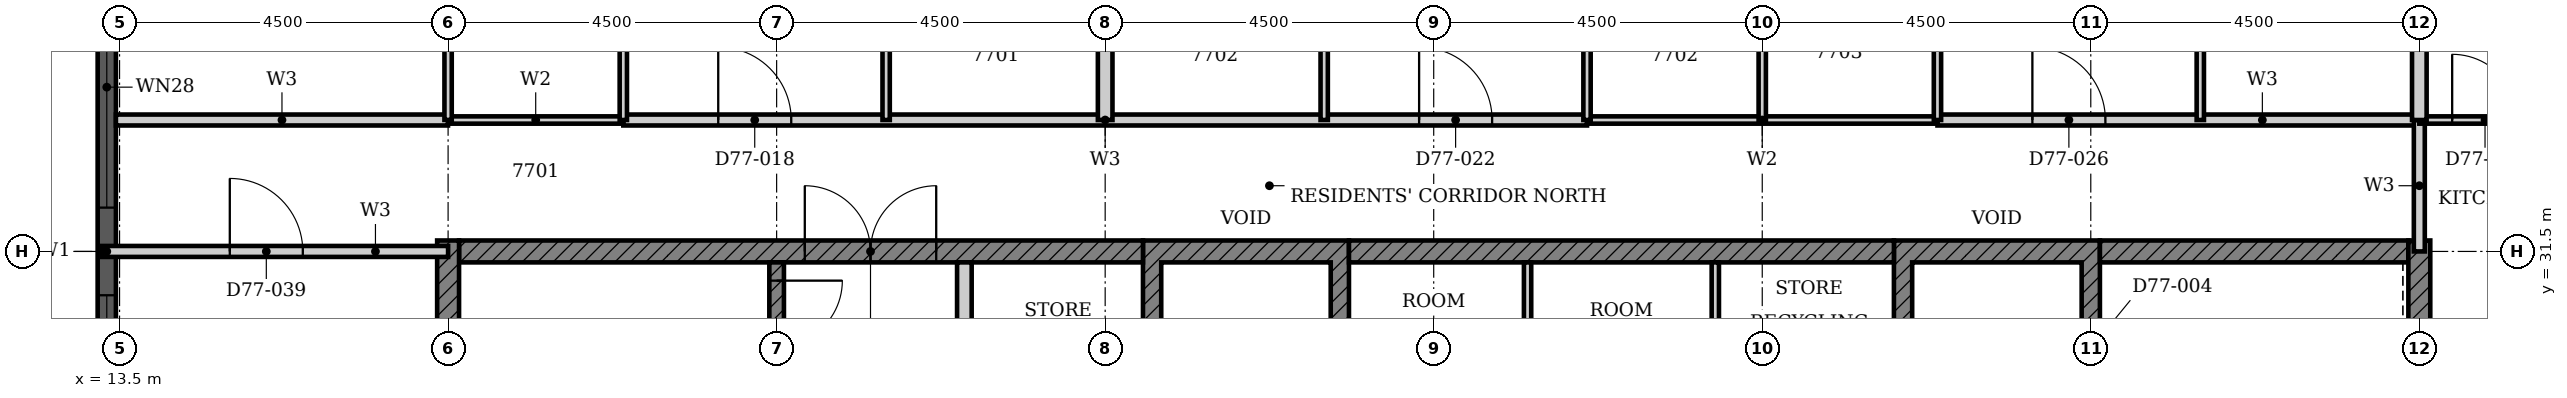
"""IFC4 building model, lengths in metres.
Left out: names, types, materials, properties, quantities, classifications, styles, units other than length and angle.
Written with IfcOpenShell. Run it as: python <this file> out.ifc"""

import sys

from ifc_helpers import new_model, si_unit, direction, frame, frame_2d, origin, place, context, subcontext, project, spatial, polyline, rectangle, outline, extrude, element, fill, save


model = new_model("IFC4")
c1 = context("Model", 3, precision=1e-05, world=origin(), true_north=direction((0.0, 1.0)))
c2 = subcontext(c1, "Body", "Model", "MODEL_VIEW")
j1 = project(units=[si_unit("LENGTHUNIT", "METRE"), si_unit("PLANEANGLEUNIT", "RADIAN")], contexts=[c1])
p1 = place(None, origin())
s1 = spatial("IfcSite", under=j1, at=p1, CompositionType="ELEMENT")
p2 = place(p1, origin())
s2 = spatial("IfcBuilding", under=s1, at=p2, CompositionType="ELEMENT")
p3 = place(p2, frame((0.0, 0.0, 301.9)))
s3 = spatial("IfcBuildingStorey", under=s2, at=p3, CompositionType="ELEMENT", Elevation=301.9)
p4 = place(p3, frame((13.325, 35.7, 0.0), z_axis=(0.0, 0.0, 1.0), x_axis=(0.0, -1.0, 0.0)))
e1 = element("IfcWall", 1, at=p4, inside=s3, PredefinedType="SOLIDWALL", context=c2, shape_type="SweptSolid", body=[
    extrude(rectangle(XDim=8.4, YDim=0.25, at=frame_2d((4.2, 0.0))), origin(), (0.0, 0.0, 1.0), 3.7),
])
p5 = place(p4, frame((0.3, 0.0, 0.45)))
e2 = element("IfcOpeningElement", 2, at=p5, cuts=e1, PredefinedType="OPENING", context=c2, shape_type="SweptSolid", body=[
    extrude(rectangle(XDim=3.3, YDim=1.8, at=frame_2d((1.65, 0.9))), frame((0.0, 0.135, 0.0), z_axis=(0.0, -1.0, 0.0), x_axis=(1.0, 0.0, 0.0)), (0.0, 0.0, 1.0), 0.27),
])
p6 = place(p4, frame((4.8, 0.0, 0.45)))
e3 = element("IfcOpeningElement", 3, at=p6, cuts=e1, PredefinedType="OPENING", context=c2, shape_type="SweptSolid", body=[
    extrude(rectangle(XDim=3.3, YDim=1.8, at=frame_2d((1.65, 0.9))), frame((0.0, 0.135, 0.0), z_axis=(0.0, -1.0, 0.0), x_axis=(1.0, 0.0, 0.0)), (0.0, 0.0, 1.0), 0.27),
])
p7 = place(p3, origin())
e4 = element("IfcWall", 4, at=p7, inside=s3, PredefinedType="SHEAR", context=c2, shape_type="SweptSolid", body=[
    extrude(outline(polyline([(27.518, 28.725), (27.768, 28.725), (27.768, 31.35), (30.089, 31.35), (30.089, 28.725), (30.339, 28.725), (30.339, 31.65), (27.518, 31.65), (27.518, 28.725)])), origin(), (0.0, 0.0, 1.0), 3.2),
])
p8 = place(p3, origin())
e5 = element("IfcWall", 5, at=p8, inside=s3, PredefinedType="SHEAR", context=c2, shape_type="SweptSolid", body=[
    extrude(outline(polyline([(37.803, 28.725), (38.053, 28.725), (38.053, 31.35), (40.375, 31.35), (40.375, 28.725), (40.625, 28.725), (40.625, 31.65), (37.803, 31.65), (37.803, 28.725)])), origin(), (0.0, 0.0, 1.0), 3.2),
])
p9 = place(p3, frame((18.15, 31.5, 0.0), z_axis=(0.0, 0.0, 1.0), x_axis=(1.0, 0.0, 0.0)))
e6 = element("IfcWall", 6, at=p9, inside=s3, PredefinedType="SHEAR", context=c2, shape_type="SweptSolid", body=[
    extrude(rectangle(XDim=9.368, YDim=0.3, at=frame_2d((4.684, 0.0))), origin(), (0.0, 0.0, 1.0), 3.2),
])
p10 = place(p9, frame((4.736, 0.0, 0.0)))
e7 = element("IfcOpeningElement", 7, at=p10, cuts=e6, PredefinedType="OPENING", context=c2, shape_type="SweptSolid", body=[
    extrude(rectangle(XDim=1.8, YDim=2.1, at=frame_2d((0.9, 1.05))), frame((0.0, 0.16, 0.0), z_axis=(0.0, -1.0, 0.0), x_axis=(1.0, 0.0, 0.0)), (0.0, 0.0, 1.0), 0.32),
])
p11 = place(p3, frame((30.339, 31.5, 0.0), z_axis=(0.0, 0.0, 1.0), x_axis=(1.0, 0.0, 0.0)))
e8 = element("IfcWall", 8, at=p11, inside=s3, PredefinedType="SHEAR", context=c2, shape_type="SweptSolid", body=[
    extrude(rectangle(XDim=7.464, YDim=0.3, at=frame_2d((3.732, 0.0))), origin(), (0.0, 0.0, 1.0), 3.2),
])
p12 = place(p3, frame((40.625, 31.5, 0.0), z_axis=(0.0, 0.0, 1.0), x_axis=(1.0, 0.0, 0.0)))
e9 = element("IfcWall", 9, at=p12, inside=s3, PredefinedType="SHEAR", context=c2, shape_type="SweptSolid", body=[
    extrude(rectangle(XDim=4.225, YDim=0.3, at=frame_2d((2.113, 0.0))), origin(), (0.0, 0.0, 1.0), 3.2),
])
for number, where, z_axis, x_axis in (
    (10, (18.0, 22.35, 0.0), (0.0, 0.0, 1.0), (0.0, 1.0, 0.0)),
    (11, (45.0, 22.35, 0.0), (0.0, 0.0, 1.0), (0.0, 1.0, 0.0)),
):
    element("IfcWall", number, at=place(p3, frame(where, z_axis=z_axis, x_axis=x_axis)), inside=s3, PredefinedType="SHEAR", context=c2, shape_type="SweptSolid", body=[
        extrude(rectangle(XDim=9.3, YDim=0.3, at=frame_2d((4.65, 0.0))), origin(), (0.0, 0.0, 1.0), 3.2),
    ])
p13 = place(p3, frame((25.072, 28.725, 0.0), z_axis=(0.0, 0.0, 1.0), x_axis=(0.0, 1.0, 0.0)))
e12 = element("IfcWall", 12, at=p13, inside=s3, PredefinedType="PARTITIONING", context=c2, shape_type="SweptSolid", body=[
    extrude(rectangle(XDim=2.625, YDim=0.2, at=frame_2d((1.312, 0.0))), origin(), (0.0, 0.0, 1.0), 3.2),
])
for number, where, z_axis, x_axis in (
    (13, (32.786, 28.725, 0.0), (0.0, 0.0, 1.0), (0.0, 1.0, 0.0)),
    (14, (35.357, 28.725, 0.0), (0.0, 0.0, 1.0), (0.0, 1.0, 0.0)),
):
    element("IfcWall", number, at=place(p3, frame(where, z_axis=z_axis, x_axis=x_axis)), inside=s3, PredefinedType="PARTITIONING", context=c2, shape_type="SweptSolid", body=[
        extrude(rectangle(XDim=2.625, YDim=0.1, at=frame_2d((1.312, 0.0))), origin(), (0.0, 0.0, 1.0), 3.2),
    ])
p14 = place(p3, frame((22.5, 31.35, 0.0), z_axis=(0.0, 0.0, 1.0), x_axis=(0.0, -1.0, 0.0)))
e15 = element("IfcWall", 15, at=p14, inside=s3, PredefinedType="SHEAR", context=c2, shape_type="SweptSolid", body=[
    extrude(rectangle(XDim=5.825, YDim=0.2, at=frame_2d((2.913, 0.0))), origin(), (0.0, 0.0, 1.0), 3.2),
])
p15 = place(p14, frame((0.25, 0.0, 0.0)))
e16 = element("IfcOpeningElement", 16, at=p15, cuts=e15, PredefinedType="OPENING", context=c2, shape_type="SweptSolid", body=[
    extrude(rectangle(XDim=1.8, YDim=2.1, at=frame_2d((0.9, 1.05))), frame((0.0, 0.11, 0.0), z_axis=(0.0, -1.0, 0.0), x_axis=(1.0, 0.0, 0.0)), (0.0, 0.0, 1.0), 0.22),
])
p16 = place(p3, frame((13.26, 31.5, 0.0), z_axis=(0.0, 0.0, 1.0), x_axis=(1.0, 0.0, 0.0)))
e17 = element("IfcWall", 17, at=p16, inside=s3, PredefinedType="PARTITIONING", context=c2, shape_type="SweptSolid", body=[
    extrude(rectangle(XDim=4.74, YDim=0.15, at=frame_2d((2.37, 0.0))), origin(), (0.0, 0.0, 1.0), 3.2),
])
p17 = place(p16, frame((1.75, 0.0, 0.0)))
e18 = element("IfcOpeningElement", 18, at=p17, cuts=e17, PredefinedType="OPENING", context=c2, shape_type="SweptSolid", body=[
    extrude(rectangle(XDim=1.0, YDim=2.2, at=frame_2d((0.5, 1.1))), frame((0.0, 0.085, 0.0), z_axis=(0.0, -1.0, 0.0), x_axis=(1.0, 0.0, 0.0)), (0.0, 0.0, 1.0), 0.17),
])
p18 = place(p3, frame((13.45, 33.3, 0.0), z_axis=(0.0, 0.0, 1.0), x_axis=(1.0, 0.0, 0.0)))
e19 = element("IfcWall", 19, at=p18, inside=s3, PredefinedType="PARTITIONING", context=c2, shape_type="SweptSolid", body=[
    extrude(rectangle(XDim=4.549, YDim=0.15, at=frame_2d((2.274, 0.0))), origin(), (0.0, 0.0, 1.0), 3.2),
])
p19 = place(p3, frame((20.4, 33.3, 0.0), z_axis=(0.0, 0.0, 1.0), x_axis=(1.0, 0.0, 0.0)))
e20 = element("IfcWall", 20, at=p19, inside=s3, PredefinedType="PARTITIONING", context=c2, shape_type="SweptSolid", body=[
    extrude(rectangle(XDim=13.2, YDim=0.15, at=frame_2d((6.6, 0.0))), origin(), (0.0, 0.0, 1.0), 3.2),
])
p20 = place(p19, frame((1.3, 0.0, 0.0)))
e21 = element("IfcOpeningElement", 21, at=p20, cuts=e20, PredefinedType="OPENING", context=c2, shape_type="SweptSolid", body=[
    extrude(rectangle(XDim=1.0, YDim=2.2, at=frame_2d((0.5, 1.1))), frame((0.0, 0.085, 0.0), z_axis=(0.0, -1.0, 0.0), x_axis=(1.0, 0.0, 0.0)), (0.0, 0.0, 1.0), 0.17),
])
p21 = place(p19, frame((10.9, 0.0, 0.0)))
e22 = element("IfcOpeningElement", 22, at=p21, cuts=e20, PredefinedType="OPENING", context=c2, shape_type="SweptSolid", body=[
    extrude(rectangle(XDim=1.0, YDim=2.2, at=frame_2d((0.5, 1.1))), frame((0.0, 0.085, 0.0), z_axis=(0.0, -1.0, 0.0), x_axis=(1.0, 0.0, 0.0)), (0.0, 0.0, 1.0), 0.17),
])
p22 = place(p3, frame((38.4, 33.3, 0.0), z_axis=(0.0, 0.0, 1.0), x_axis=(1.0, 0.0, 0.0)))
e23 = element("IfcWall", 23, at=p22, inside=s3, PredefinedType="PARTITIONING", context=c2, shape_type="SweptSolid", body=[
    extrude(rectangle(XDim=6.6, YDim=0.15, at=frame_2d((3.3, 0.0))), origin(), (0.0, 0.0, 1.0), 3.2),
])
p23 = place(p22, frame((1.3, 0.0, 0.0)))
e24 = element("IfcOpeningElement", 24, at=p23, cuts=e23, PredefinedType="OPENING", context=c2, shape_type="SweptSolid", body=[
    extrude(rectangle(XDim=1.0, YDim=2.2, at=frame_2d((0.5, 1.1))), frame((0.0, 0.085, 0.0), z_axis=(0.0, -1.0, 0.0), x_axis=(1.0, 0.0, 0.0)), (0.0, 0.0, 1.0), 0.17),
])
p24 = place(p3, frame((45.0, 31.5, 0.0), z_axis=(0.0, 0.0, 1.0), x_axis=(0.0, 1.0, 0.0)))
e25 = element("IfcWall", 25, at=p24, inside=s3, PredefinedType="PARTITIONING", context=c2, shape_type="SweptSolid", body=[
    extrude(rectangle(XDim=1.8, YDim=0.15, at=frame_2d((0.9, 0.0))), origin(), (0.0, 0.0, 1.0), 3.2),
])
p25 = place(p3, frame((45.0, 33.3, 0.0), z_axis=(0.0, 0.0, 1.0), x_axis=(1.0, 0.0, 0.0)))
e26 = element("IfcWall", 26, at=p25, inside=s3, PredefinedType="PARTITIONING", context=c2, shape_type="SweptSolid", body=[
    extrude(rectangle(XDim=1.8, YDim=0.1, at=frame_2d((0.9, 0.0))), origin(), (0.0, 0.0, 1.0), 3.2),
])
p26 = place(p25, frame((0.45, 0.0, 0.0)))
e27 = element("IfcOpeningElement", 27, at=p26, cuts=e26, PredefinedType="OPENING", context=c2, shape_type="SweptSolid", body=[
    extrude(rectangle(XDim=0.9, YDim=2.1, at=frame_2d((0.45, 1.05))), frame((0.0, 0.06, 0.0), z_axis=(0.0, -1.0, 0.0), x_axis=(1.0, 0.0, 0.0)), (0.0, 0.0, 1.0), 0.12),
])
for number, where, z_axis, x_axis in (
    (28, (24.0, 33.3, 0.0), (0.0, 0.0, 1.0), (0.0, 1.0, 0.0)),
    (29, (30.0, 33.3, 0.0), (0.0, 0.0, 1.0), (0.0, 1.0, 0.0)),
    (30, (42.0, 33.3, 0.0), (0.0, 0.0, 1.0), (0.0, 1.0, 0.0)),
):
    element("IfcWall", number, at=place(p3, frame(where, z_axis=z_axis, x_axis=x_axis)), inside=s3, PredefinedType="PARTITIONING", context=c2, shape_type="SweptSolid", body=[
        extrude(rectangle(XDim=2.7, YDim=0.1, at=frame_2d((1.35, 0.0))), origin(), (0.0, 0.0, 1.0), 3.2),
    ])
p27 = place(p3, frame((27.0, 33.3, 0.0), z_axis=(0.0, 0.0, 1.0), x_axis=(0.0, 1.0, 0.0)))
e31 = element("IfcWall", 31, at=p27, inside=s3, PredefinedType="PARTITIONING", context=c2, shape_type="SweptSolid", body=[
    extrude(rectangle(XDim=7.39, YDim=0.2, at=frame_2d((3.695, 0.0))), origin(), (0.0, 0.0, 1.0), 3.2),
])
p28 = place(p3, frame((45.0, 33.3, 0.0), z_axis=(0.0, 0.0, 1.0), x_axis=(0.0, 1.0, 0.0)))
e32 = element("IfcWall", 32, at=p28, inside=s3, PredefinedType="PARTITIONING", context=c2, shape_type="SweptSolid", body=[
    extrude(rectangle(XDim=4.9, YDim=0.2, at=frame_2d((2.45, 0.0))), origin(), (0.0, 0.0, 1.0), 3.2),
])
p29 = place(p3, frame((18.0, 33.3, 0.0), z_axis=(0.0, 0.0, 1.0), x_axis=(1.0, 0.0, 0.0)))
e33 = element("IfcWall", 33, at=p29, inside=s3, PredefinedType="PARTITIONING", context=c2, shape_type="SweptSolid", body=[
    extrude(rectangle(XDim=2.4, YDim=0.1, at=frame_2d((1.2, 0.0))), origin(), (0.0, 0.0, 1.0), 3.2),
])
p30 = place(p3, frame((33.6, 33.3, 0.0), z_axis=(0.0, 0.0, 1.0), x_axis=(1.0, 0.0, 0.0)))
e34 = element("IfcWall", 34, at=p30, inside=s3, PredefinedType="PARTITIONING", context=c2, shape_type="SweptSolid", body=[
    extrude(rectangle(XDim=4.8, YDim=0.1, at=frame_2d((2.4, 0.0))), origin(), (0.0, 0.0, 1.0), 3.2),
])
p31 = place(p3, frame((18.0, 33.301, 0.0), z_axis=(0.0, 0.0, 1.0), x_axis=(0.0, 1.0, 0.0)))
e35 = element("IfcWall", 35, at=p31, inside=s3, PredefinedType="PARTITIONING", context=c2, shape_type="SweptSolid", body=[
    extrude(rectangle(XDim=2.699, YDim=0.1, at=frame_2d((1.35, 0.0))), origin(), (0.0, 0.0, 1.0), 3.2),
])
p32 = place(p3, frame((20.4, 33.3, 0.0), z_axis=(0.0, 0.0, 1.0), x_axis=(0.0, 1.0, 0.0)))
e36 = element("IfcWall", 36, at=p32, inside=s3, PredefinedType="PARTITIONING", context=c2, shape_type="SweptSolid", body=[
    extrude(rectangle(XDim=2.7, YDim=0.1, at=frame_2d((1.35, 0.0))), origin(), (0.0, 0.0, 1.0), 3.2),
])
p33 = place(p32, frame((0.95, 0.0, 0.0)))
e37 = element("IfcOpeningElement", 37, at=p33, cuts=e36, PredefinedType="OPENING", context=c2, shape_type="SweptSolid", body=[
    extrude(rectangle(XDim=0.8, YDim=2.1, at=frame_2d((0.4, 1.05))), frame((0.0, 0.06, 0.0), z_axis=(0.0, -1.0, 0.0), x_axis=(1.0, 0.0, 0.0)), (0.0, 0.0, 1.0), 0.12),
])
p34 = place(p3, frame((33.6, 33.3, 0.0), z_axis=(0.0, 0.0, 1.0), x_axis=(0.0, 1.0, 0.0)))
e38 = element("IfcWall", 38, at=p34, inside=s3, PredefinedType="PARTITIONING", context=c2, shape_type="SweptSolid", body=[
    extrude(rectangle(XDim=2.7, YDim=0.1, at=frame_2d((1.35, 0.0))), origin(), (0.0, 0.0, 1.0), 3.2),
])
p35 = place(p34, frame((0.95, 0.0, 0.0)))
e39 = element("IfcOpeningElement", 39, at=p35, cuts=e38, PredefinedType="OPENING", context=c2, shape_type="SweptSolid", body=[
    extrude(rectangle(XDim=0.8, YDim=2.1, at=frame_2d((0.4, 1.05))), frame((0.0, 0.06, 0.0), z_axis=(0.0, -1.0, 0.0), x_axis=(1.0, 0.0, 0.0)), (0.0, 0.0, 1.0), 0.12),
])
p36 = place(p3, frame((36.0, 33.3, 0.0), z_axis=(0.0, 0.0, 1.0), x_axis=(0.0, 1.0, 0.0)))
e40 = element("IfcWall", 40, at=p36, inside=s3, PredefinedType="PARTITIONING", context=c2, shape_type="SweptSolid", body=[
    extrude(rectangle(XDim=2.7, YDim=0.1, at=frame_2d((1.35, 0.0))), origin(), (0.0, 0.0, 1.0), 3.2),
])
p37 = place(p3, frame((38.4, 33.3, 0.0), z_axis=(0.0, 0.0, 1.0), x_axis=(0.0, 1.0, 0.0)))
e41 = element("IfcWall", 41, at=p37, inside=s3, PredefinedType="PARTITIONING", context=c2, shape_type="SweptSolid", body=[
    extrude(rectangle(XDim=2.7, YDim=0.1, at=frame_2d((1.35, 0.0))), origin(), (0.0, 0.0, 1.0), 3.2),
])
p38 = place(p37, frame((0.95, 0.0, 0.0)))
e42 = element("IfcOpeningElement", 42, at=p38, cuts=e41, PredefinedType="OPENING", context=c2, shape_type="SweptSolid", body=[
    extrude(rectangle(XDim=0.8, YDim=2.1, at=frame_2d((0.4, 1.05))), frame((0.0, 0.06, 0.0), z_axis=(0.0, -1.0, 0.0), x_axis=(1.0, 0.0, 0.0)), (0.0, 0.0, 1.0), 0.12),
])
p39 = place(p5, origin())
e43 = element("IfcWindow", 43, at=p39, inside=s3, PartitioningType="SINGLE_PANEL", PredefinedType="WINDOW", context=c2, shape_type="SweptSolid", body=[
    extrude(rectangle(XDim=3.3, YDim=1.8, at=frame_2d((1.65, 0.9))), frame((0.0, 0.03, 0.0), z_axis=(0.0, -1.0, 0.0), x_axis=(1.0, 0.0, 0.0)), (0.0, 0.0, 1.0), 0.06),
])
fill(e2, e43)
p40 = place(p6, origin())
e44 = element("IfcWindow", 44, at=p40, inside=s3, PartitioningType="SINGLE_PANEL", PredefinedType="WINDOW", context=c2, shape_type="SweptSolid", body=[
    extrude(rectangle(XDim=3.3, YDim=1.8, at=frame_2d((1.65, 0.9))), frame((0.0, 0.03, 0.0), z_axis=(0.0, -1.0, 0.0), x_axis=(1.0, 0.0, 0.0)), (0.0, 0.0, 1.0), 0.06),
])
fill(e3, e44)
p41 = place(p15, origin())
e45 = element("IfcDoor", 45, at=p41, inside=s3, OperationType="DOUBLE_DOOR_SINGLE_SWING", PredefinedType="DOOR", context=c2, shape_type="SweptSolid", body=[
    extrude(rectangle(XDim=1.8, YDim=2.1, at=frame_2d((0.9, 1.05))), frame((0.0, 0.025, 0.0), z_axis=(0.0, -1.0, 0.0), x_axis=(1.0, 0.0, 0.0)), (0.0, 0.0, 1.0), 0.05),
])
fill(e16, e45)
p42 = place(p10, origin())
e46 = element("IfcDoor", 46, at=p42, inside=s3, OperationType="DOUBLE_DOOR_SINGLE_SWING", PredefinedType="DOOR", context=c2, shape_type="SweptSolid", body=[
    extrude(rectangle(XDim=1.8, YDim=2.1, at=frame_2d((0.9, 1.05))), frame((0.0, 0.025, 0.0), z_axis=(0.0, -1.0, 0.0), x_axis=(1.0, 0.0, 0.0)), (0.0, 0.0, 1.0), 0.05),
])
fill(e7, e46)
p43 = place(p20, origin())
e47 = element("IfcDoor", 47, at=p43, inside=s3, OperationType="SINGLE_SWING_RIGHT", PredefinedType="DOOR", context=c2, shape_type="SweptSolid", body=[
    extrude(rectangle(XDim=1.0, YDim=2.2, at=frame_2d((0.5, 1.1))), frame((0.0, 0.025, 0.0), z_axis=(0.0, -1.0, 0.0), x_axis=(1.0, 0.0, 0.0)), (0.0, 0.0, 1.0), 0.05),
])
fill(e21, e47)
p44 = place(p21, origin())
e48 = element("IfcDoor", 48, at=p44, inside=s3, OperationType="SINGLE_SWING_RIGHT", PredefinedType="DOOR", context=c2, shape_type="SweptSolid", body=[
    extrude(rectangle(XDim=1.0, YDim=2.2, at=frame_2d((0.5, 1.1))), frame((0.0, 0.025, 0.0), z_axis=(0.0, -1.0, 0.0), x_axis=(1.0, 0.0, 0.0)), (0.0, 0.0, 1.0), 0.05),
])
fill(e22, e48)
p45 = place(p23, origin())
e49 = element("IfcDoor", 49, at=p45, inside=s3, OperationType="SINGLE_SWING_RIGHT", PredefinedType="DOOR", context=c2, shape_type="SweptSolid", body=[
    extrude(rectangle(XDim=1.0, YDim=2.2, at=frame_2d((0.5, 1.1))), frame((0.0, 0.025, 0.0), z_axis=(0.0, -1.0, 0.0), x_axis=(1.0, 0.0, 0.0)), (0.0, 0.0, 1.0), 0.05),
])
fill(e24, e49)
p46 = place(p17, origin())
e50 = element("IfcDoor", 50, at=p46, inside=s3, OperationType="SINGLE_SWING_RIGHT", PredefinedType="DOOR", context=c2, shape_type="SweptSolid", body=[
    extrude(rectangle(XDim=1.0, YDim=2.2, at=frame_2d((0.5, 1.1))), frame((0.0, 0.025, 0.0), z_axis=(0.0, -1.0, 0.0), x_axis=(1.0, 0.0, 0.0)), (0.0, 0.0, 1.0), 0.05),
])
fill(e18, e50)
p47 = place(p26, origin())
e51 = element("IfcDoor", 51, at=p47, inside=s3, OperationType="SINGLE_SWING_LEFT", PredefinedType="DOOR", context=c2, shape_type="SweptSolid", body=[
    extrude(rectangle(XDim=0.9, YDim=2.1, at=frame_2d((0.45, 1.05))), frame((0.0, 0.025, 0.0), z_axis=(0.0, -1.0, 0.0), x_axis=(1.0, 0.0, 0.0)), (0.0, 0.0, 1.0), 0.05),
])
fill(e27, e51)
save(model, sys.argv[1])
